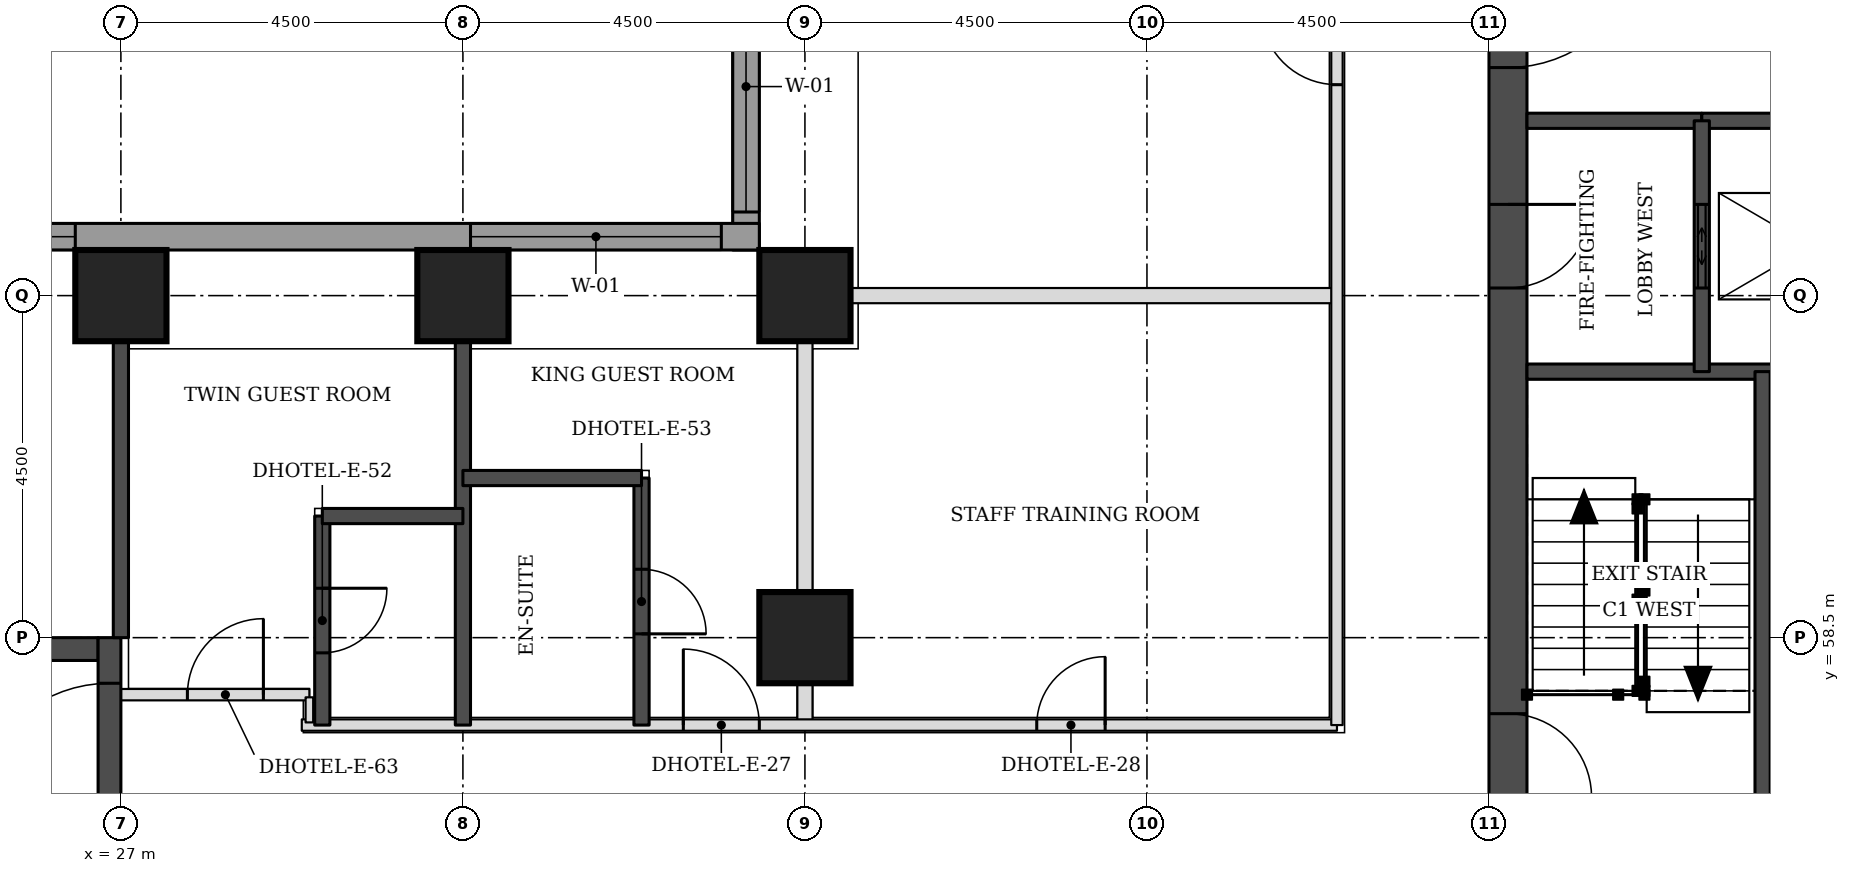
"""IFC4 building model, lengths in metres.
Left out: names, types, materials, properties, quantities, classifications, styles, units other than length and angle.
Written with IfcOpenShell. Run it as: python <this file> out.ifc"""

import sys

from ifc_helpers import new_model, si_unit, direction, frame, frame_2d, origin, origin_2d, place, context, subcontext, project, spatial, rectangle, extrude, element, fill, save


model = new_model("IFC4")
c1 = context("Model", 3, precision=1e-05, world=origin(), true_north=direction((0.0, 1.0)))
c2 = subcontext(c1, "Body", "Model", "MODEL_VIEW")
j1 = project(units=[si_unit("LENGTHUNIT", "METRE"), si_unit("PLANEANGLEUNIT", "RADIAN")], contexts=[c1])
p1 = place(None, origin())
s1 = spatial("IfcSite", under=j1, at=p1, CompositionType="ELEMENT")
p2 = place(p1, origin())
s2 = spatial("IfcBuilding", under=s1, at=p2, CompositionType="ELEMENT")
p3 = place(p2, frame((0.0, 0.0, 39.6)))
s3 = spatial("IfcBuildingStorey", under=s2, at=p3, CompositionType="ELEMENT", Elevation=39.6)
for number, where, z_axis, x_axis in (
    (1, (36.0, 58.5, 0.0), (0.0, 0.0, 1.0), (1.0, 0.0, 0.0)),
    (2, (27.0, 63.0, 0.0), (0.0, 0.0, 1.0), (1.0, 0.0, 0.0)),
    (3, (31.5, 63.0, 0.0), (0.0, 0.0, 1.0), (1.0, 0.0, 0.0)),
    (4, (36.0, 63.0, 0.0), (0.0, 0.0, 1.0), (1.0, 0.0, 0.0)),
):
    element("IfcColumn", number, at=place(p3, frame(where, z_axis=z_axis, x_axis=x_axis)), inside=s3, PredefinedType="COLUMN", context=c2, shape_type="SweptSolid", body=[
        extrude(rectangle(XDim=1.2, YDim=1.2, at=origin_2d()), origin(), (0.0, 0.0, 1.0), 3.3),
    ])
p4 = place(p3, frame((45.25, 49.5, 0.0), z_axis=(0.0, 0.0, 1.0), x_axis=(0.0, 1.0, 0.0)))
e5 = element("IfcWall", 5, at=p4, inside=s3, PredefinedType="SHEAR", context=c2, shape_type="SweptSolid", body=[
    extrude(rectangle(XDim=22.5, YDim=0.5, at=frame_2d((11.25, 0.0))), origin(), (0.0, 0.0, 1.0), 3.3),
])
p5 = place(p4, frame((4.2, 0.0, 0.0)))
e6 = element("IfcOpeningElement", 6, at=p5, cuts=e5, PredefinedType="OPENING", context=c2, shape_type="SweptSolid", body=[
    extrude(rectangle(XDim=1.8, YDim=2.1, at=frame_2d((0.9, 1.05))), frame((0.0, 0.26, 0.0), z_axis=(0.0, -1.0, 0.0), x_axis=(1.0, 0.0, 0.0)), (0.0, 0.0, 1.0), 0.52),
])
p6 = place(p4, frame((6.9, 0.0, 0.0)))
e7 = element("IfcOpeningElement", 7, at=p6, cuts=e5, PredefinedType="OPENING", context=c2, shape_type="SweptSolid", body=[
    extrude(rectangle(XDim=1.1, YDim=2.1, at=frame_2d((0.55, 1.05))), frame((0.0, 0.26, 0.0), z_axis=(0.0, -1.0, 0.0), x_axis=(1.0, 0.0, 0.0)), (0.0, 0.0, 1.0), 0.52),
])
p7 = place(p4, frame((13.6, 0.0, 0.0)))
e8 = element("IfcOpeningElement", 8, at=p7, cuts=e5, PredefinedType="OPENING", context=c2, shape_type="SweptSolid", body=[
    extrude(rectangle(XDim=1.1, YDim=2.1, at=frame_2d((0.55, 1.05))), frame((0.0, 0.26, 0.0), z_axis=(0.0, -1.0, 0.0), x_axis=(1.0, 0.0, 0.0)), (0.0, 0.0, 1.0), 0.52),
])
p8 = place(p4, frame((16.5, 0.0, 0.0)))
e9 = element("IfcOpeningElement", 9, at=p8, cuts=e5, PredefinedType="OPENING", context=c2, shape_type="SweptSolid", body=[
    extrude(rectangle(XDim=1.8, YDim=2.1, at=frame_2d((0.9, 1.05))), frame((0.0, 0.26, 0.0), z_axis=(0.0, -1.0, 0.0), x_axis=(1.0, 0.0, 0.0)), (0.0, 0.0, 1.0), 0.52),
])
p9 = place(p3, frame((18.3, 58.35, 0.0), z_axis=(0.0, 0.0, 1.0), x_axis=(1.0, 0.0, 0.0)))
e10 = element("IfcWall", 10, at=p9, inside=s3, PredefinedType="SHEAR", context=c2, shape_type="SweptSolid", body=[
    extrude(rectangle(XDim=8.4, YDim=0.3, at=frame_2d((4.2, 0.0))), origin(), (0.0, 0.0, 1.0), 3.3),
])
p10 = place(p3, frame((26.85, 49.5, 0.0), z_axis=(0.0, 0.0, 1.0), x_axis=(0.0, 1.0, 0.0)))
e11 = element("IfcWall", 11, at=p10, inside=s3, PredefinedType="SHEAR", context=c2, shape_type="SweptSolid", body=[
    extrude(rectangle(XDim=9.0, YDim=0.3, at=frame_2d((4.5, 0.0))), origin(), (0.0, 0.0, 1.0), 3.3),
])
p11 = place(p10, frame((6.6, 0.0, 0.0)))
e12 = element("IfcOpeningElement", 12, at=p11, cuts=e11, PredefinedType="OPENING", context=c2, shape_type="SweptSolid", body=[
    extrude(rectangle(XDim=1.8, YDim=2.1, at=frame_2d((0.9, 1.05))), frame((0.0, 0.16, 0.0), z_axis=(0.0, -1.0, 0.0), x_axis=(1.0, 0.0, 0.0)), (0.0, 0.0, 1.0), 0.32),
])
p12 = place(p3, frame((35.225, 76.894, 0.0), z_axis=(0.0, 0.0, 1.0), x_axis=(0.0, -1.0, 0.0)))
e13 = element("IfcWall", 13, at=p12, inside=s3, PredefinedType="STANDARD", context=c2, shape_type="SweptSolid", body=[
    extrude(rectangle(XDim=13.293, YDim=0.35, at=frame_2d((6.647, 0.0))), origin(), (0.0, 0.0, 1.0), 3.055),
])
p13 = place(p12, frame((9.493, 0.0, 0.8)))
e14 = element("IfcOpeningElement", 14, at=p13, cuts=e13, PredefinedType="OPENING", context=c2, shape_type="SweptSolid", body=[
    extrude(rectangle(XDim=3.3, YDim=1.5, at=frame_2d((1.65, 0.75))), frame((0.0, 0.185, 0.0), z_axis=(0.0, -1.0, 0.0), x_axis=(1.0, 0.0, 0.0)), (0.0, 0.0, 1.0), 0.37),
])
p14 = place(p3, frame((35.4, 63.775, 0.0), z_axis=(0.0, 0.0, 1.0), x_axis=(-1.0, 0.0, 0.0)))
e15 = element("IfcWall", 15, at=p14, inside=s3, PredefinedType="STANDARD", context=c2, shape_type="SweptSolid", body=[
    extrude(rectangle(XDim=17.793, YDim=0.35, at=frame_2d((8.897, 0.0))), origin(), (0.0, 0.0, 1.0), 3.055),
])
p15 = place(p14, frame((0.5, 0.0, 0.8)))
e16 = element("IfcOpeningElement", 16, at=p15, cuts=e15, PredefinedType="OPENING", context=c2, shape_type="SweptSolid", body=[
    extrude(rectangle(XDim=3.3, YDim=1.5, at=frame_2d((1.65, 0.75))), frame((0.0, 0.185, 0.0), z_axis=(0.0, -1.0, 0.0), x_axis=(1.0, 0.0, 0.0)), (0.0, 0.0, 1.0), 0.37),
])
p16 = place(p14, frame((9.0, 0.0, 0.8)))
e17 = element("IfcOpeningElement", 17, at=p16, cuts=e15, PredefinedType="OPENING", context=c2, shape_type="SweptSolid", body=[
    extrude(rectangle(XDim=3.3, YDim=1.5, at=frame_2d((1.65, 0.75))), frame((0.0, 0.185, 0.0), z_axis=(0.0, -1.0, 0.0), x_axis=(1.0, 0.0, 0.0)), (0.0, 0.0, 1.0), 0.37),
])
p17 = place(p3, frame((36.0, 57.35, 0.0), z_axis=(0.0, 0.0, 1.0), x_axis=(0.0, 1.0, 0.0)))
e18 = element("IfcWall", 18, at=p17, inside=s3, PredefinedType="PARTITIONING", context=c2, shape_type="SweptSolid", body=[
    extrude(rectangle(XDim=5.05, YDim=0.2, at=frame_2d((2.525, 0.0))), origin(), (0.0, 0.0, 1.0), 2.33),
])
p18 = place(p3, frame((36.6, 63.0, 0.0), z_axis=(0.0, 0.0, 1.0), x_axis=(1.0, 0.0, 0.0)))
e19 = element("IfcWall", 19, at=p18, inside=s3, PredefinedType="PARTITIONING", context=c2, shape_type="SweptSolid", body=[
    extrude(rectangle(XDim=6.4, YDim=0.2, at=frame_2d((3.2, 0.0))), origin(), (0.0, 0.0, 1.0), 3.08),
])
p19 = place(p3, frame((29.38, 57.35, 0.0), z_axis=(0.0, 0.0, 1.0), x_axis=(1.0, 0.0, 0.0)))
e20 = element("IfcWall", 20, at=p19, inside=s3, PredefinedType="PARTITIONING", context=c2, shape_type="SweptSolid", body=[
    extrude(rectangle(XDim=13.62, YDim=0.15, at=frame_2d((6.81, 0.0))), origin(), (0.0, 0.0, 1.0), 3.08),
])
p20 = place(p19, frame((5.02, 0.0, 0.0)))
e21 = element("IfcOpeningElement", 21, at=p20, cuts=e20, PredefinedType="OPENING", context=c2, shape_type="SweptSolid", body=[
    extrude(rectangle(XDim=1.0, YDim=2.1, at=frame_2d((0.5, 1.05))), frame((0.0, 0.085, 0.0), z_axis=(0.0, -1.0, 0.0), x_axis=(1.0, 0.0, 0.0)), (0.0, 0.0, 1.0), 0.17),
])
p21 = place(p19, frame((9.67, 0.0, 0.0)))
e22 = element("IfcOpeningElement", 22, at=p21, cuts=e20, PredefinedType="OPENING", context=c2, shape_type="SweptSolid", body=[
    extrude(rectangle(XDim=0.9, YDim=2.1, at=frame_2d((0.45, 1.05))), frame((0.0, 0.085, 0.0), z_axis=(0.0, -1.0, 0.0), x_axis=(1.0, 0.0, 0.0)), (0.0, 0.0, 1.0), 0.17),
])
p22 = place(p3, frame((43.0, 57.35, 0.0), z_axis=(0.0, 0.0, 1.0), x_axis=(0.0, 1.0, 0.0)))
e23 = element("IfcWall", 23, at=p22, inside=s3, PredefinedType="PARTITIONING", context=c2, shape_type="SweptSolid", body=[
    extrude(rectangle(XDim=16.65, YDim=0.15, at=frame_2d((8.325, 0.0))), origin(), (0.0, 0.0, 1.0), 3.08),
])
p23 = place(p22, frame((8.425, 0.0, 0.0)))
e24 = element("IfcOpeningElement", 24, at=p23, cuts=e23, PredefinedType="OPENING", context=c2, shape_type="SweptSolid", body=[
    extrude(rectangle(XDim=1.0, YDim=2.1, at=frame_2d((0.5, 1.05))), frame((0.0, 0.085, 0.0), z_axis=(0.0, -1.0, 0.0), x_axis=(1.0, 0.0, 0.0)), (0.0, 0.0, 1.0), 0.17),
])
p24 = place(p22, frame((15.203, 0.0, 0.0)))
e25 = element("IfcOpeningElement", 25, at=p24, cuts=e23, PredefinedType="OPENING", context=c2, shape_type="SweptSolid", body=[
    extrude(rectangle(XDim=1.0, YDim=2.1, at=frame_2d((0.5, 1.05))), frame((0.0, 0.085, 0.0), z_axis=(0.0, -1.0, 0.0), x_axis=(1.0, 0.0, 0.0)), (0.0, 0.0, 1.0), 0.17),
])
p25 = place(p3, frame((27.0, 58.5, 0.0), z_axis=(0.0, 0.0, 1.0), x_axis=(0.0, 1.0, 0.0)))
e26 = element("IfcWall", 26, at=p25, inside=s3, PredefinedType="SOLIDWALL", context=c2, shape_type="SweptSolid", body=[
    extrude(rectangle(XDim=3.9, YDim=0.2, at=frame_2d((1.95, 0.0))), origin(), (0.0, 0.0, 1.0), 3.08),
])
p26 = place(p3, frame((29.65, 57.35, 0.0), z_axis=(0.0, 0.0, 1.0), x_axis=(0.0, 1.0, 0.0)))
e27 = element("IfcWall", 27, at=p26, inside=s3, PredefinedType="SOLIDWALL", context=c2, shape_type="SweptSolid", body=[
    extrude(rectangle(XDim=2.75, YDim=0.2, at=frame_2d((1.375, 0.0))), origin(), (0.0, 0.0, 1.0), 3.08),
])
p27 = place(p26, frame((0.95, 0.0, 0.0)))
e28 = element("IfcOpeningElement", 28, at=p27, cuts=e27, PredefinedType="OPENING", context=c2, shape_type="SweptSolid", body=[
    extrude(rectangle(XDim=0.85, YDim=2.1, at=frame_2d((0.425, 1.05))), frame((0.0, 0.11, 0.0), z_axis=(0.0, -1.0, 0.0), x_axis=(1.0, 0.0, 0.0)), (0.0, 0.0, 1.0), 0.22),
])
p28 = place(p3, frame((31.5, 57.35, 0.0), z_axis=(0.0, 0.0, 1.0), x_axis=(0.0, 1.0, 0.0)))
e29 = element("IfcWall", 29, at=p28, inside=s3, PredefinedType="SOLIDWALL", context=c2, shape_type="SweptSolid", body=[
    extrude(rectangle(XDim=5.05, YDim=0.2, at=frame_2d((2.525, 0.0))), origin(), (0.0, 0.0, 1.0), 3.08),
])
p29 = place(p3, frame((33.85, 57.35, 0.0), z_axis=(0.0, 0.0, 1.0), x_axis=(0.0, 1.0, 0.0)))
e30 = element("IfcWall", 30, at=p29, inside=s3, PredefinedType="SOLIDWALL", context=c2, shape_type="SweptSolid", body=[
    extrude(rectangle(XDim=3.25, YDim=0.2, at=frame_2d((1.625, 0.0))), origin(), (0.0, 0.0, 1.0), 3.08),
])
p30 = place(p29, frame((1.2, 0.0, 0.0)))
e31 = element("IfcOpeningElement", 31, at=p30, cuts=e30, PredefinedType="OPENING", context=c2, shape_type="SweptSolid", body=[
    extrude(rectangle(XDim=0.85, YDim=2.1, at=frame_2d((0.425, 1.05))), frame((0.0, 0.11, 0.0), z_axis=(0.0, -1.0, 0.0), x_axis=(1.0, 0.0, 0.0)), (0.0, 0.0, 1.0), 0.22),
])
p31 = place(p3, frame((29.65, 60.1, 0.0), z_axis=(0.0, 0.0, 1.0), x_axis=(1.0, 0.0, 0.0)))
e32 = element("IfcWall", 32, at=p31, inside=s3, PredefinedType="SOLIDWALL", context=c2, shape_type="SweptSolid", body=[
    extrude(rectangle(XDim=1.85, YDim=0.2, at=frame_2d((0.925, 0.0))), origin(), (0.0, 0.0, 1.0), 3.08),
])
p32 = place(p3, frame((31.5, 60.6, 0.0), z_axis=(0.0, 0.0, 1.0), x_axis=(1.0, 0.0, 0.0)))
e33 = element("IfcWall", 33, at=p32, inside=s3, PredefinedType="SOLIDWALL", context=c2, shape_type="SweptSolid", body=[
    extrude(rectangle(XDim=2.35, YDim=0.2, at=frame_2d((1.175, 0.0))), origin(), (0.0, 0.0, 1.0), 3.08),
])
p33 = place(p3, frame((27.0, 57.75, 0.0), z_axis=(0.0, 0.0, 1.0), x_axis=(1.0, 0.0, 0.0)))
e34 = element("IfcWall", 34, at=p33, inside=s3, PredefinedType="PARTITIONING", context=c2, shape_type="SweptSolid", body=[
    extrude(rectangle(XDim=2.48, YDim=0.15, at=frame_2d((1.24, 0.0))), origin(), (0.0, 0.0, 1.0), 3.08),
])
p34 = place(p33, frame((0.875, 0.0, 0.0)))
e35 = element("IfcOpeningElement", 35, at=p34, cuts=e34, PredefinedType="OPENING", context=c2, shape_type="SweptSolid", body=[
    extrude(rectangle(XDim=1.0, YDim=2.1, at=frame_2d((0.5, 1.05))), frame((0.0, 0.085, 0.0), z_axis=(0.0, -1.0, 0.0), x_axis=(1.0, 0.0, 0.0)), (0.0, 0.0, 1.0), 0.17),
])
p35 = place(p3, frame((29.48, 57.385, 0.0), z_axis=(0.0, 0.0, 1.0), x_axis=(0.0, 1.0, 0.0)))
e36 = element("IfcWall", 36, at=p35, inside=s3, PredefinedType="PARTITIONING", context=c2, shape_type="SweptSolid", body=[
    extrude(rectangle(XDim=0.33, YDim=0.1, at=frame_2d((0.165, 0.0))), origin(), (0.0, 0.0, 1.0), 3.08),
])
p36 = place(p3, frame((45.5, 62.0, 0.0), z_axis=(0.0, 0.0, 1.0), x_axis=(1.0, 0.0, 0.0)))
e37 = element("IfcWall", 37, at=p36, inside=s3, PredefinedType="SOLIDWALL", context=c2, shape_type="SweptSolid", body=[
    extrude(rectangle(XDim=5.15, YDim=0.2, at=frame_2d((2.575, 0.0))), origin(), (0.0, 0.0, 1.0), 3.08),
])
p37 = place(p3, frame((45.5, 65.3, 0.0), z_axis=(0.0, 0.0, 1.0), x_axis=(1.0, 0.0, 0.0)))
e38 = element("IfcWall", 38, at=p37, inside=s3, PredefinedType="SOLIDWALL", context=c2, shape_type="SweptSolid", body=[
    extrude(rectangle(XDim=2.3, YDim=0.2, at=frame_2d((1.15, 0.0))), origin(), (0.0, 0.0, 1.0), 3.08),
])
p38 = place(p3, frame((47.8, 65.3, 0.0), z_axis=(0.0, 0.0, 1.0), x_axis=(1.0, 0.0, 0.0)))
e39 = element("IfcWall", 39, at=p38, inside=s3, PredefinedType="SOLIDWALL", context=c2, shape_type="SweptSolid", body=[
    extrude(rectangle(XDim=16.9, YDim=0.2, at=frame_2d((8.45, 0.0))), origin(), (0.0, 0.0, 1.0), 3.08),
])
p39 = place(p3, frame((47.8, 62.0, 0.0), z_axis=(0.0, 0.0, 1.0), x_axis=(0.0, 1.0, 0.0)))
e40 = element("IfcWall", 40, at=p39, inside=s3, PredefinedType="SOLIDWALL", context=c2, shape_type="SweptSolid", body=[
    extrude(rectangle(XDim=3.3, YDim=0.2, at=frame_2d((1.65, 0.0))), origin(), (0.0, 0.0, 1.0), 3.08),
])
p40 = place(p39, frame((1.1, 0.0, 0.0)))
e41 = element("IfcOpeningElement", 41, at=p40, cuts=e40, PredefinedType="OPENING", context=c2, shape_type="SweptSolid", body=[
    extrude(rectangle(XDim=1.1, YDim=2.1, at=frame_2d((0.55, 1.05))), frame((0.0, 0.11, 0.0), z_axis=(0.0, -1.0, 0.0), x_axis=(1.0, 0.0, 0.0)), (0.0, 0.0, 1.0), 0.22),
])
p41 = place(p3, frame((48.6, 56.2, 0.0), z_axis=(0.0, 0.0, 1.0), x_axis=(0.0, 1.0, 0.0)))
e42 = element("IfcWall", 42, at=p41, inside=s3, PredefinedType="SOLIDWALL", context=c2, shape_type="SweptSolid", body=[
    extrude(rectangle(XDim=5.8, YDim=0.2, at=frame_2d((2.9, 0.0))), origin(), (0.0, 0.0, 1.0), 3.08),
])
p42 = place(p13, origin())
e43 = element("IfcWindow", 43, at=p42, inside=s3, PartitioningType="SINGLE_PANEL", PredefinedType="WINDOW", context=c2, shape_type="SweptSolid", body=[
    extrude(rectangle(XDim=3.3, YDim=1.5, at=frame_2d((1.65, 0.75))), frame((0.0, 0.085, 0.0), z_axis=(0.0, -1.0, 0.0), x_axis=(1.0, 0.0, 0.0)), (0.0, 0.0, 1.0), 0.06),
])
fill(e14, e43)
p43 = place(p15, origin())
e44 = element("IfcWindow", 44, at=p43, inside=s3, PartitioningType="SINGLE_PANEL", PredefinedType="WINDOW", context=c2, shape_type="SweptSolid", body=[
    extrude(rectangle(XDim=3.3, YDim=1.5, at=frame_2d((1.65, 0.75))), frame((0.0, 0.085, 0.0), z_axis=(0.0, -1.0, 0.0), x_axis=(1.0, 0.0, 0.0)), (0.0, 0.0, 1.0), 0.06),
])
fill(e16, e44)
p44 = place(p16, origin())
e45 = element("IfcWindow", 45, at=p44, inside=s3, PartitioningType="SINGLE_PANEL", PredefinedType="WINDOW", context=c2, shape_type="SweptSolid", body=[
    extrude(rectangle(XDim=3.3, YDim=1.5, at=frame_2d((1.65, 0.75))), frame((0.0, 0.085, 0.0), z_axis=(0.0, -1.0, 0.0), x_axis=(1.0, 0.0, 0.0)), (0.0, 0.0, 1.0), 0.06),
])
fill(e17, e45)
p45 = place(p20, origin())
e46 = element("IfcDoor", 46, at=p45, inside=s3, OperationType="SINGLE_SWING_LEFT", PredefinedType="DOOR", context=c2, shape_type="SweptSolid", body=[
    extrude(rectangle(XDim=1.0, YDim=2.1, at=frame_2d((0.5, 1.05))), frame((0.0, 0.025, 0.0), z_axis=(0.0, -1.0, 0.0), x_axis=(1.0, 0.0, 0.0)), (0.0, 0.0, 1.0), 0.05),
])
fill(e21, e46)
p46 = place(p30, frame((0.85, 0.0, 0.0), z_axis=(0.0, 0.0, 1.0), x_axis=(-1.0, 0.0, 0.0)))
e47 = element("IfcDoor", 47, at=p46, inside=s3, OperationType="SINGLE_SWING_RIGHT", PredefinedType="DOOR", context=c2, shape_type="SweptSolid", body=[
    extrude(rectangle(XDim=0.85, YDim=2.1, at=frame_2d((0.425, 1.05))), frame((0.0, 0.025, 0.0), z_axis=(0.0, -1.0, 0.0), x_axis=(1.0, 0.0, 0.0)), (0.0, 0.0, 1.0), 0.05),
])
fill(e31, e47)
p47 = place(p27, frame((0.85, 0.0, 0.0), z_axis=(0.0, 0.0, 1.0), x_axis=(-1.0, 0.0, 0.0)))
e48 = element("IfcDoor", 48, at=p47, inside=s3, OperationType="SINGLE_SWING_LEFT", PredefinedType="DOOR", context=c2, shape_type="SweptSolid", body=[
    extrude(rectangle(XDim=0.85, YDim=2.1, at=frame_2d((0.425, 1.05))), frame((0.0, 0.025, 0.0), z_axis=(0.0, -1.0, 0.0), x_axis=(1.0, 0.0, 0.0)), (0.0, 0.0, 1.0), 0.05),
])
fill(e28, e48)
p48 = place(p23, origin())
e49 = element("IfcDoor", 49, at=p48, inside=s3, OperationType="SINGLE_SWING_RIGHT", PredefinedType="DOOR", context=c2, shape_type="SweptSolid", body=[
    extrude(rectangle(XDim=1.0, YDim=2.1, at=frame_2d((0.5, 1.05))), frame((0.0, 0.025, 0.0), z_axis=(0.0, -1.0, 0.0), x_axis=(1.0, 0.0, 0.0)), (0.0, 0.0, 1.0), 0.05),
])
fill(e24, e49)
p49 = place(p21, origin())
e50 = element("IfcDoor", 50, at=p49, inside=s3, OperationType="SINGLE_SWING_RIGHT", PredefinedType="DOOR", context=c2, shape_type="SweptSolid", body=[
    extrude(rectangle(XDim=0.9, YDim=2.1, at=frame_2d((0.45, 1.05))), frame((0.0, 0.025, 0.0), z_axis=(0.0, -1.0, 0.0), x_axis=(1.0, 0.0, 0.0)), (0.0, 0.0, 1.0), 0.05),
])
fill(e22, e50)
p50 = place(p34, origin())
e51 = element("IfcDoor", 51, at=p50, inside=s3, OperationType="SINGLE_SWING_RIGHT", PredefinedType="DOOR", context=c2, shape_type="SweptSolid", body=[
    extrude(rectangle(XDim=1.0, YDim=2.1, at=frame_2d((0.5, 1.05))), frame((0.0, 0.025, 0.0), z_axis=(0.0, -1.0, 0.0), x_axis=(1.0, 0.0, 0.0)), (0.0, 0.0, 1.0), 0.05),
])
fill(e35, e51)
p51 = place(p40, origin())
e52 = element("IfcDoor", 52, at=p51, inside=s3, OperationType="DOUBLE_DOOR_SLIDING", PredefinedType="DOOR", context=c2, shape_type="SweptSolid", body=[
    extrude(rectangle(XDim=1.1, YDim=2.1, at=frame_2d((0.55, 1.05))), frame((0.0, 0.025, 0.0), z_axis=(0.0, -1.0, 0.0), x_axis=(1.0, 0.0, 0.0)), (0.0, 0.0, 1.0), 0.05),
])
fill(e41, e52)
p52 = place(p6, frame((1.1, 0.0, 0.0), z_axis=(0.0, 0.0, 1.0), x_axis=(-1.0, 0.0, 0.0)))
e53 = element("IfcDoor", 53, at=p52, inside=s3, OperationType="SINGLE_SWING_RIGHT", PredefinedType="DOOR", context=c2, shape_type="SweptSolid", body=[
    extrude(rectangle(XDim=1.1, YDim=2.1, at=frame_2d((0.55, 1.05))), frame((0.0, 0.025, 0.0), z_axis=(0.0, -1.0, 0.0), x_axis=(1.0, 0.0, 0.0)), (0.0, 0.0, 1.0), 0.05),
])
fill(e7, e53)
p53 = place(p7, frame((1.1, 0.0, 0.0), z_axis=(0.0, 0.0, 1.0), x_axis=(-1.0, 0.0, 0.0)))
e54 = element("IfcDoor", 54, at=p53, inside=s3, OperationType="SINGLE_SWING_LEFT", PredefinedType="DOOR", context=c2, shape_type="SweptSolid", body=[
    extrude(rectangle(XDim=1.1, YDim=2.1, at=frame_2d((0.55, 1.05))), frame((0.0, 0.025, 0.0), z_axis=(0.0, -1.0, 0.0), x_axis=(1.0, 0.0, 0.0)), (0.0, 0.0, 1.0), 0.05),
])
fill(e8, e54)
p54 = place(p8, frame((1.8, 0.0, 0.0), z_axis=(0.0, 0.0, 1.0), x_axis=(-1.0, 0.0, 0.0)))
e55 = element("IfcDoor", 55, at=p54, inside=s3, OperationType="SINGLE_SWING_LEFT", PredefinedType="DOOR", context=c2, shape_type="SweptSolid", body=[
    extrude(rectangle(XDim=1.8, YDim=2.1, at=frame_2d((0.9, 1.05))), frame((0.0, 0.025, 0.0), z_axis=(0.0, -1.0, 0.0), x_axis=(1.0, 0.0, 0.0)), (0.0, 0.0, 1.0), 0.05),
])
fill(e9, e55)
p55 = place(p11, origin())
e56 = element("IfcDoor", 56, at=p55, inside=s3, OperationType="SINGLE_SWING_LEFT", PredefinedType="DOOR", context=c2, shape_type="SweptSolid", body=[
    extrude(rectangle(XDim=1.8, YDim=2.1, at=frame_2d((0.9, 1.05))), frame((0.0, 0.025, 0.0), z_axis=(0.0, -1.0, 0.0), x_axis=(1.0, 0.0, 0.0)), (0.0, 0.0, 1.0), 0.05),
])
fill(e12, e56)
save(model, sys.argv[1])
